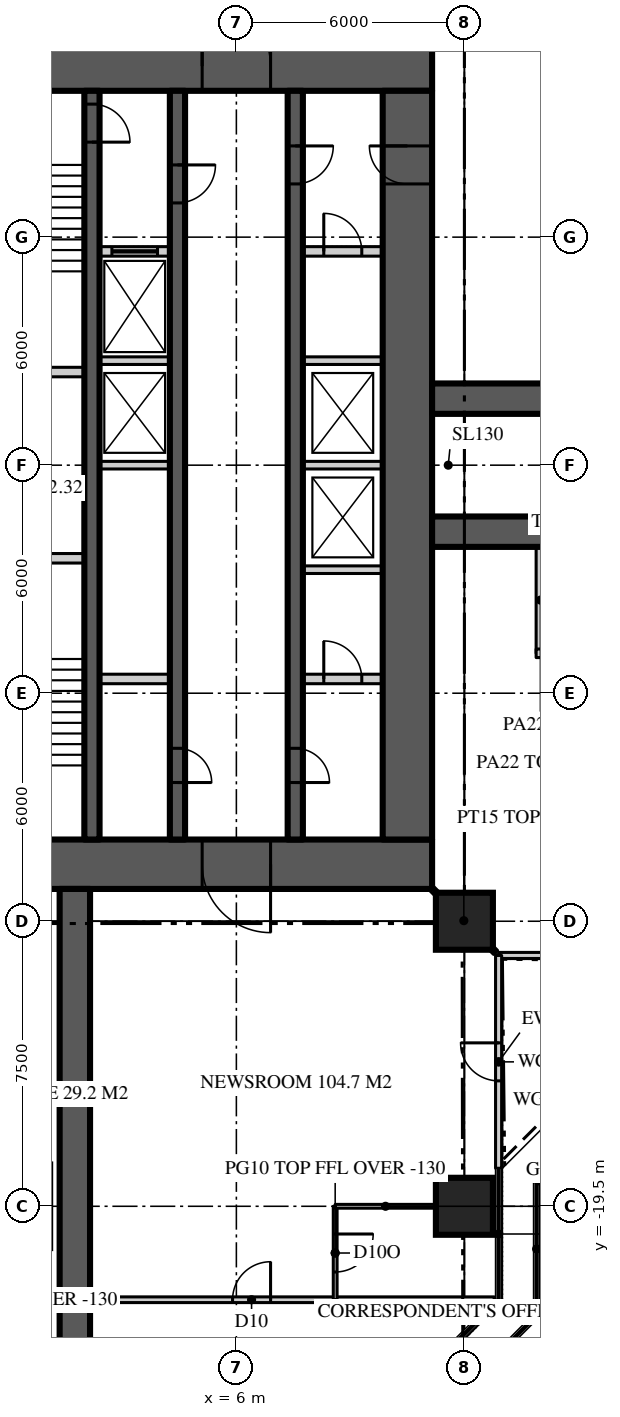
"""IFC4 building model, lengths in metres.
Left out: names, types, materials, properties, quantities, classifications, styles, units other than length and angle.
Written with IfcOpenShell. Run it as: python <this file> out.ifc"""

import sys

from ifc_helpers import new_model, si_unit, direction, frame, frame_2d, origin, origin_2d, place, context, subcontext, project, spatial, rectangle, extrude, element, fill, save


model = new_model("IFC4")
c1 = context("Model", 3, precision=1e-05, world=origin(), true_north=direction((0.0, 1.0)))
c2 = subcontext(c1, "Body", "Model", "MODEL_VIEW")
j1 = project(units=[si_unit("LENGTHUNIT", "METRE"), si_unit("PLANEANGLEUNIT", "RADIAN")], contexts=[c1])
p1 = place(None, origin())
s1 = spatial("IfcSite", under=j1, at=p1, CompositionType="ELEMENT")
p2 = place(p1, origin())
s2 = spatial("IfcBuilding", under=s1, at=p2, CompositionType="ELEMENT")
p3 = place(p2, frame((0.0, 0.0, 247.8)))
s3 = spatial("IfcBuildingStorey", under=s2, at=p3, CompositionType="ELEMENT", Elevation=247.8)
p4 = place(p3, frame((-11.15, 10.5, 0.0), z_axis=(0.0, 0.0, 1.0), x_axis=(1.0, 0.0, 0.0)))
e1 = element("IfcWall", 1, at=p4, inside=s3, PredefinedType="SHEAR", context=c2, shape_type="SweptSolid", body=[
    extrude(rectangle(XDim=22.3, YDim=1.3, at=frame_2d((11.15, 0.0))), origin(), (0.0, 0.0, 1.0), 3.9),
])
p5 = place(p4, frame((4.25, 0.0, 0.0)))
e2 = element("IfcOpeningElement", 2, at=p5, cuts=e1, PredefinedType="OPENING", context=c2, shape_type="SweptSolid", body=[
    extrude(rectangle(XDim=1.8, YDim=2.2, at=frame_2d((0.9, 1.1))), frame((0.0, 0.66, 0.0), z_axis=(0.0, -1.0, 0.0), x_axis=(1.0, 0.0, 0.0)), (0.0, 0.0, 1.0), 1.32),
])
p6 = place(p4, frame((16.25, 0.0, 0.0)))
e3 = element("IfcOpeningElement", 3, at=p6, cuts=e1, PredefinedType="OPENING", context=c2, shape_type="SweptSolid", body=[
    extrude(rectangle(XDim=1.8, YDim=2.2, at=frame_2d((0.9, 1.1))), frame((0.0, 0.66, 0.0), z_axis=(0.0, -1.0, 0.0), x_axis=(1.0, 0.0, 0.0)), (0.0, 0.0, 1.0), 1.32),
])
p7 = place(p3, frame((11.15, -10.5, 0.0), z_axis=(0.0, 0.0, 1.0), x_axis=(-1.0, 0.0, 0.0)))
e4 = element("IfcWall", 4, at=p7, inside=s3, PredefinedType="SHEAR", context=c2, shape_type="SweptSolid", body=[
    extrude(rectangle(XDim=22.3, YDim=1.3, at=frame_2d((11.15, 0.0))), origin(), (0.0, 0.0, 1.0), 3.9),
])
p8 = place(p7, frame((16.25, 0.0, 0.0)))
e5 = element("IfcOpeningElement", 5, at=p8, cuts=e4, PredefinedType="OPENING", context=c2, shape_type="SweptSolid", body=[
    extrude(rectangle(XDim=1.8, YDim=2.2, at=frame_2d((0.9, 1.1))), frame((0.0, 0.66, 0.0), z_axis=(0.0, -1.0, 0.0), x_axis=(1.0, 0.0, 0.0)), (0.0, 0.0, 1.0), 1.32),
])
p9 = place(p7, frame((4.25, 0.0, 0.0)))
e6 = element("IfcOpeningElement", 6, at=p9, cuts=e4, PredefinedType="OPENING", context=c2, shape_type="SweptSolid", body=[
    extrude(rectangle(XDim=1.8, YDim=2.2, at=frame_2d((0.9, 1.1))), frame((0.0, 0.66, 0.0), z_axis=(0.0, -1.0, 0.0), x_axis=(1.0, 0.0, 0.0)), (0.0, 0.0, 1.0), 1.32),
])
p10 = place(p3, frame((10.5, -9.85, 0.0), z_axis=(0.0, 0.0, 1.0), x_axis=(0.0, 1.0, 0.0)))
e7 = element("IfcWall", 7, at=p10, inside=s3, PredefinedType="SHEAR", context=c2, shape_type="SweptSolid", body=[
    extrude(rectangle(XDim=19.7, YDim=1.3, at=frame_2d((9.85, 0.0))), origin(), (0.0, 0.0, 1.0), 3.9),
])
p11 = place(p10, frame((17.25, 0.0, 0.0)))
e8 = element("IfcOpeningElement", 8, at=p11, cuts=e7, PredefinedType="OPENING", context=c2, shape_type="SweptSolid", body=[
    extrude(rectangle(XDim=1.0, YDim=2.2, at=frame_2d((0.5, 1.1))), frame((0.0, 0.66, 0.0), z_axis=(0.0, -1.0, 0.0), x_axis=(1.0, 0.0, 0.0)), (0.0, 0.0, 1.0), 1.32),
])
for number, where, z_axis, x_axis in (
    (9, (11.15, -1.75, 0.0), (0.0, 0.0, 1.0), (1.0, 0.0, 0.0)),
    (10, (11.15, 1.75, 0.0), (0.0, 0.0, 1.0), (1.0, 0.0, 0.0)),
    (11, (1.75, -11.15, 0.0), (0.0, 0.0, 1.0), (0.0, -1.0, 0.0)),
):
    element("IfcWall", number, at=place(p3, frame(where, z_axis=z_axis, x_axis=x_axis)), inside=s3, PredefinedType="SHEAR", context=c2, shape_type="SweptSolid", body=[
        extrude(rectangle(XDim=15.25, YDim=0.8, at=frame_2d((7.625, 0.0))), origin(), (0.0, 0.0, 1.0), 3.9),
    ])
for number, where, z_axis, x_axis in (
    (12, (12.0, -19.5, 0.0), (0.0, 0.0, 1.0), (1.0, 0.0, 0.0)),
    (13, (12.0, -12.0, 0.0), (0.0, 0.0, 1.0), (1.0, 0.0, 0.0)),
):
    element("IfcColumn", number, at=place(p3, frame(where, z_axis=z_axis, x_axis=x_axis)), inside=s3, PredefinedType="COLUMN", context=c2, shape_type="SweptSolid", body=[
        extrude(rectangle(XDim=1.5, YDim=1.5, at=origin_2d()), origin(), (0.0, 0.0, 1.0), 3.9),
    ])
p12 = place(p3, frame((12.9, -12.9, 0.0), z_axis=(0.0, 0.0, 1.0), x_axis=(1.0, 0.0, 0.0)))
e14 = element("IfcWall", 14, at=p12, inside=s3, PredefinedType="SOLIDWALL", context=c2, shape_type="SweptSolid", body=[
    extrude(rectangle(XDim=5.6, YDim=0.16, at=frame_2d((2.8, 0.0))), origin(), (0.0, 0.0, 1.0), 3.77),
])
p13 = place(p3, frame((12.9, -18.5, 0.0), z_axis=(0.0, 0.0, 1.0), x_axis=(0.0, 1.0, 0.0)))
e15 = element("IfcWall", 15, at=p13, inside=s3, PredefinedType="SOLIDWALL", context=c2, shape_type="SweptSolid", body=[
    extrude(rectangle(XDim=5.6, YDim=0.16, at=frame_2d((2.8, 0.0))), origin(), (0.0, 0.0, 1.0), 3.77),
])
p14 = place(p13, frame((2.3, 0.0, 0.0)))
e16 = element("IfcOpeningElement", 16, at=p14, cuts=e15, PredefinedType="OPENING", context=c2, shape_type="SweptSolid", body=[
    extrude(rectangle(XDim=1.0, YDim=2.2, at=frame_2d((0.5, 1.1))), frame((0.0, 0.09, 0.0), z_axis=(0.0, -1.0, 0.0), x_axis=(1.0, 0.0, 0.0)), (0.0, 0.0, 1.0), 0.18),
])
p15 = place(p3, frame((7.55, 9.85, 0.0), z_axis=(0.0, 0.0, 1.0), x_axis=(0.0, -1.0, 0.0)))
e17 = element("IfcWall", 17, at=p15, inside=s3, PredefinedType="SHEAR", context=c2, shape_type="SweptSolid", body=[
    extrude(rectangle(XDim=19.7, YDim=0.4, at=frame_2d((9.85, 0.0))), origin(), (0.0, 0.0, 1.0), 3.9),
])
p16 = place(p15, frame((1.45, 0.0, 0.0)))
e18 = element("IfcOpeningElement", 18, at=p16, cuts=e17, PredefinedType="OPENING", context=c2, shape_type="SweptSolid", body=[
    extrude(rectangle(XDim=1.0, YDim=2.2, at=frame_2d((0.5, 1.1))), frame((0.0, 0.21, 0.0), z_axis=(0.0, -1.0, 0.0), x_axis=(1.0, 0.0, 0.0)), (0.0, 0.0, 1.0), 0.42),
])
p17 = place(p15, frame((17.3, 0.0, 0.0)))
e19 = element("IfcOpeningElement", 19, at=p17, cuts=e17, PredefinedType="OPENING", context=c2, shape_type="SweptSolid", body=[
    extrude(rectangle(XDim=0.9, YDim=2.1, at=frame_2d((0.45, 1.05))), frame((0.0, 0.21, 0.0), z_axis=(0.0, -1.0, 0.0), x_axis=(1.0, 0.0, 0.0)), (0.0, 0.0, 1.0), 0.42),
])
p18 = place(p3, frame((4.45, 9.85, 0.0), z_axis=(0.0, 0.0, 1.0), x_axis=(0.0, -1.0, 0.0)))
e20 = element("IfcWall", 20, at=p18, inside=s3, PredefinedType="SHEAR", context=c2, shape_type="SweptSolid", body=[
    extrude(rectangle(XDim=19.7, YDim=0.4, at=frame_2d((9.85, 0.0))), origin(), (0.0, 0.0, 1.0), 3.9),
])
p19 = place(p18, frame((1.95, 0.0, 0.0)))
e21 = element("IfcOpeningElement", 21, at=p19, cuts=e20, PredefinedType="OPENING", context=c2, shape_type="SweptSolid", body=[
    extrude(rectangle(XDim=1.0, YDim=2.2, at=frame_2d((0.5, 1.1))), frame((0.0, 0.21, 0.0), z_axis=(0.0, -1.0, 0.0), x_axis=(1.0, 0.0, 0.0)), (0.0, 0.0, 1.0), 0.42),
])
p20 = place(p18, frame((17.3, 0.0, 0.0)))
e22 = element("IfcOpeningElement", 22, at=p20, cuts=e20, PredefinedType="OPENING", context=c2, shape_type="SweptSolid", body=[
    extrude(rectangle(XDim=0.9, YDim=2.1, at=frame_2d((0.45, 1.05))), frame((0.0, 0.21, 0.0), z_axis=(0.0, -1.0, 0.0), x_axis=(1.0, 0.0, 0.0)), (0.0, 0.0, 1.0), 0.42),
])
p21 = place(p3, frame((2.2, 9.85, 0.0), z_axis=(0.0, 0.0, 1.0), x_axis=(0.0, -1.0, 0.0)))
e23 = element("IfcWall", 23, at=p21, inside=s3, PredefinedType="SHEAR", context=c2, shape_type="SweptSolid", body=[
    extrude(rectangle(XDim=19.7, YDim=0.4, at=frame_2d((9.85, 0.0))), origin(), (0.0, 0.0, 1.0), 3.9),
])
p22 = place(p21, frame((0.35, 0.0, 0.0)))
e24 = element("IfcOpeningElement", 24, at=p22, cuts=e23, PredefinedType="OPENING", context=c2, shape_type="SweptSolid", body=[
    extrude(rectangle(XDim=1.0, YDim=2.2, at=frame_2d((0.5, 1.1))), frame((0.0, 0.21, 0.0), z_axis=(0.0, -1.0, 0.0), x_axis=(1.0, 0.0, 0.0)), (0.0, 0.0, 1.0), 0.42),
])
p23 = place(p3, frame((2.4, 5.625, 0.0), z_axis=(0.0, 0.0, 1.0), x_axis=(1.0, 0.0, 0.0)))
e25 = element("IfcWall", 25, at=p23, inside=s3, PredefinedType="SOLIDWALL", context=c2, shape_type="SweptSolid", body=[
    extrude(rectangle(XDim=1.85, YDim=0.25, at=frame_2d((0.925, 0.0))), origin(), (0.0, 0.0, 1.0), 3.7),
])
p24 = place(p23, frame((0.325, 0.0, 0.0)))
e26 = element("IfcOpeningElement", 26, at=p24, cuts=e25, PredefinedType="OPENING", context=c2, shape_type="SweptSolid", body=[
    extrude(rectangle(XDim=1.2, YDim=2.2, at=frame_2d((0.6, 1.1))), frame((0.0, 0.135, 0.0), z_axis=(0.0, -1.0, 0.0), x_axis=(1.0, 0.0, 0.0)), (0.0, 0.0, 1.0), 0.27),
])
p25 = place(p3, frame((7.75, 5.625, 0.0), z_axis=(0.0, 0.0, 1.0), x_axis=(1.0, 0.0, 0.0)))
e27 = element("IfcWall", 27, at=p25, inside=s3, PredefinedType="SOLIDWALL", context=c2, shape_type="SweptSolid", body=[
    extrude(rectangle(XDim=2.1, YDim=0.25, at=frame_2d((1.05, 0.0))), origin(), (0.0, 0.0, 1.0), 3.7),
])
p26 = place(p25, frame((0.55, 0.0, 0.0)))
e28 = element("IfcOpeningElement", 28, at=p26, cuts=e27, PredefinedType="OPENING", context=c2, shape_type="SweptSolid", body=[
    extrude(rectangle(XDim=1.0, YDim=2.2, at=frame_2d((0.5, 1.1))), frame((0.0, 0.135, 0.0), z_axis=(0.0, -1.0, 0.0), x_axis=(1.0, 0.0, 0.0)), (0.0, 0.0, 1.0), 0.27),
])
p27 = place(p3, frame((2.4, -5.625, 0.0), z_axis=(0.0, 0.0, 1.0), x_axis=(1.0, 0.0, 0.0)))
e29 = element("IfcWall", 29, at=p27, inside=s3, PredefinedType="SOLIDWALL", context=c2, shape_type="SweptSolid", body=[
    extrude(rectangle(XDim=1.85, YDim=0.25, at=frame_2d((0.925, 0.0))), origin(), (0.0, 0.0, 1.0), 3.7),
])
p28 = place(p3, frame((7.75, -5.625, 0.0), z_axis=(0.0, 0.0, 1.0), x_axis=(1.0, 0.0, 0.0)))
e30 = element("IfcWall", 30, at=p28, inside=s3, PredefinedType="SOLIDWALL", context=c2, shape_type="SweptSolid", body=[
    extrude(rectangle(XDim=2.1, YDim=0.25, at=frame_2d((1.05, 0.0))), origin(), (0.0, 0.0, 1.0), 3.7),
])
p29 = place(p28, frame((0.55, 0.0, 0.0)))
e31 = element("IfcOpeningElement", 31, at=p29, cuts=e30, PredefinedType="OPENING", context=c2, shape_type="SweptSolid", body=[
    extrude(rectangle(XDim=1.0, YDim=2.2, at=frame_2d((0.5, 1.1))), frame((0.0, 0.135, 0.0), z_axis=(0.0, -1.0, 0.0), x_axis=(1.0, 0.0, 0.0)), (0.0, 0.0, 1.0), 0.27),
])
for number, where, z_axis, x_axis in (
    (32, (-2.0, -2.45, 0.0), (0.0, 0.0, 1.0), (1.0, 0.0, 0.0)),
    (33, (-2.0, 2.45, 0.0), (0.0, 0.0, 1.0), (1.0, 0.0, 0.0)),
):
    element("IfcWall", number, at=place(p3, frame(where, z_axis=z_axis, x_axis=x_axis)), inside=s3, PredefinedType="SOLIDWALL", context=c2, shape_type="SweptSolid", body=[
        extrude(rectangle(XDim=4.0, YDim=0.25, at=frame_2d((2.0, 0.0))), origin(), (0.0, 0.0, 1.0), 3.7),
    ])
p30 = place(p3, frame((7.75, -2.75, 0.0), z_axis=(0.0, 0.0, 1.0), x_axis=(1.0, 0.0, 0.0)))
e34 = element("IfcWall", 34, at=p30, inside=s3, PredefinedType="SOLIDWALL", context=c2, shape_type="SweptSolid", body=[
    extrude(rectangle(XDim=2.1, YDim=0.2, at=frame_2d((1.05, 0.0))), origin(), (0.0, 0.0, 1.0), 3.7),
])
p31 = place(p3, frame((2.4, 0.0, 0.0), z_axis=(0.0, 0.0, 1.0), x_axis=(1.0, 0.0, 0.0)))
e35 = element("IfcWall", 35, at=p31, inside=s3, PredefinedType="SOLIDWALL", context=c2, shape_type="SweptSolid", body=[
    extrude(rectangle(XDim=1.85, YDim=0.2, at=frame_2d((0.925, 0.0))), origin(), (0.0, 0.0, 1.0), 3.7),
])
p32 = place(p3, frame((7.75, 0.0, 0.0), z_axis=(0.0, 0.0, 1.0), x_axis=(1.0, 0.0, 0.0)))
e36 = element("IfcWall", 36, at=p32, inside=s3, PredefinedType="SOLIDWALL", context=c2, shape_type="SweptSolid", body=[
    extrude(rectangle(XDim=2.1, YDim=0.2, at=frame_2d((1.05, 0.0))), origin(), (0.0, 0.0, 1.0), 3.7),
])
p33 = place(p3, frame((2.4, 2.75, 0.0), z_axis=(0.0, 0.0, 1.0), x_axis=(1.0, 0.0, 0.0)))
e37 = element("IfcWall", 37, at=p33, inside=s3, PredefinedType="SOLIDWALL", context=c2, shape_type="SweptSolid", body=[
    extrude(rectangle(XDim=1.85, YDim=0.2, at=frame_2d((0.925, 0.0))), origin(), (0.0, 0.0, 1.0), 3.7),
])
p34 = place(p3, frame((7.75, 2.75, 0.0), z_axis=(0.0, 0.0, 1.0), x_axis=(1.0, 0.0, 0.0)))
e38 = element("IfcWall", 38, at=p34, inside=s3, PredefinedType="SOLIDWALL", context=c2, shape_type="SweptSolid", body=[
    extrude(rectangle(XDim=2.1, YDim=0.2, at=frame_2d((1.05, 0.0))), origin(), (0.0, 0.0, 1.0), 3.7),
])
p35 = place(p3, frame((14.0, -2.15, 0.0), z_axis=(0.0, 0.0, 1.0), x_axis=(0.0, -1.0, 0.0)))
e39 = element("IfcWall", 39, at=p35, inside=s3, PredefinedType="PARTITIONING", context=c2, shape_type="SweptSolid", body=[
    extrude(rectangle(XDim=2.8, YDim=0.225, at=frame_2d((1.4, 0.0))), origin(), (0.0, 0.0, 1.0), 3.18),
])
p36 = place(p3, frame((13.887, -4.95, 0.0), z_axis=(0.0, 0.0, 1.0), x_axis=(1.0, 0.0, 0.0)))
e40 = element("IfcWall", 40, at=p36, inside=s3, PredefinedType="PARTITIONING", context=c2, shape_type="SweptSolid", body=[
    extrude(rectangle(XDim=2.625, YDim=0.225, at=frame_2d((1.312, 0.0))), origin(), (0.0, 0.0, 1.0), 3.77),
])
p37 = place(p36, frame((0.712, 0.0, 0.0)))
e41 = element("IfcOpeningElement", 41, at=p37, cuts=e40, PredefinedType="OPENING", context=c2, shape_type="SweptSolid", body=[
    extrude(rectangle(XDim=1.2, YDim=2.2, at=frame_2d((0.6, 1.1))), frame((0.0, 0.123, 0.0), z_axis=(0.0, -1.0, 0.0), x_axis=(1.0, 0.0, 0.0)), (0.0, 0.0, 1.0), 0.245),
])
p38 = place(p3, frame((-12.786, -21.959, 0.0), z_axis=(0.0, 0.0, 1.0), x_axis=(1.0, 0.0, 0.0)))
e42 = element("IfcWall", 42, at=p38, inside=s3, PredefinedType="PARTITIONING", context=c2, shape_type="SweptSolid", body=[
    extrude(rectangle(XDim=25.573, YDim=0.15, at=frame_2d((12.786, 0.0))), origin(), (0.0, 0.0, 1.0), 3.77),
])
p39 = place(p38, frame((18.687, 0.0, 0.0)))
e43 = element("IfcOpeningElement", 43, at=p39, cuts=e42, PredefinedType="OPENING", context=c2, shape_type="SweptSolid", body=[
    extrude(rectangle(XDim=1.0, YDim=2.2, at=frame_2d((0.5, 1.1))), frame((0.0, 0.085, 0.0), z_axis=(0.0, -1.0, 0.0), x_axis=(1.0, 0.0, 0.0)), (0.0, 0.0, 1.0), 0.17),
])
p40 = place(p38, frame((5.886, 0.0, 0.0)))
e44 = element("IfcOpeningElement", 44, at=p40, cuts=e42, PredefinedType="OPENING", context=c2, shape_type="SweptSolid", body=[
    extrude(rectangle(XDim=1.0, YDim=2.2, at=frame_2d((0.5, 1.1))), frame((0.0, 0.085, 0.0), z_axis=(0.0, -1.0, 0.0), x_axis=(1.0, 0.0, 0.0)), (0.0, 0.0, 1.0), 0.17),
])
p41 = place(p3, frame((8.6, -19.5, 0.0), z_axis=(0.0, 0.0, 1.0), x_axis=(0.0, -1.0, 0.0)))
e45 = element("IfcWall", 45, at=p41, inside=s3, PredefinedType="PARTITIONING", context=c2, shape_type="SweptSolid", body=[
    extrude(rectangle(XDim=2.459, YDim=0.1, at=frame_2d((1.229, 0.0))), origin(), (0.0, 0.0, 1.0), 3.77),
])
p42 = place(p41, frame((0.729, 0.0, 0.0)))
e46 = element("IfcOpeningElement", 46, at=p42, cuts=e45, PredefinedType="OPENING", context=c2, shape_type="SweptSolid", body=[
    extrude(rectangle(XDim=1.0, YDim=2.2, at=frame_2d((0.5, 1.1))), frame((0.0, 0.06, 0.0), z_axis=(0.0, -1.0, 0.0), x_axis=(1.0, 0.0, 0.0)), (0.0, 0.0, 1.0), 0.12),
])
p43 = place(p3, frame((8.6, -19.5, 0.0), z_axis=(0.0, 0.0, 1.0), x_axis=(1.0, 0.0, 0.0)))
e47 = element("IfcWall", 47, at=p43, inside=s3, PredefinedType="PARTITIONING", context=c2, shape_type="SweptSolid", body=[
    extrude(rectangle(XDim=2.65, YDim=0.1, at=frame_2d((1.325, 0.0))), origin(), (0.0, 0.0, 1.0), 2.77),
])
p44 = place(p3, frame((11.15, -11.15, 0.0), z_axis=(0.0, 0.0, 1.0), x_axis=(0.707106781187, -0.707106781187, 0.0)))
e48 = element("IfcWall", 48, at=p44, inside=s3, PredefinedType="PARTITIONING", context=c2, shape_type="SweptSolid", body=[
    extrude(rectangle(XDim=2.362, YDim=0.15, at=frame_2d((1.181, 0.0))), origin(), (0.0, 0.0, 1.0), 3.22),
])
p45 = place(p14, origin())
e49 = element("IfcDoor", 49, at=p45, inside=s3, OperationType="SINGLE_SWING_RIGHT", PredefinedType="DOOR", context=c2, shape_type="SweptSolid", body=[
    extrude(rectangle(XDim=1.0, YDim=2.2, at=frame_2d((0.5, 1.1))), frame((0.0, 0.025, 0.0), z_axis=(0.0, -1.0, 0.0), x_axis=(1.0, 0.0, 0.0)), (0.0, 0.0, 1.0), 0.05),
])
fill(e16, e49)
p46 = place(p6, origin())
e50 = element("IfcDoor", 50, at=p46, inside=s3, OperationType="DOUBLE_DOOR_DOUBLE_SWING", PredefinedType="DOOR", context=c2, shape_type="SweptSolid", body=[
    extrude(rectangle(XDim=1.8, YDim=2.2, at=frame_2d((0.9, 1.1))), frame((0.0, 0.025, 0.0), z_axis=(0.0, -1.0, 0.0), x_axis=(1.0, 0.0, 0.0)), (0.0, 0.0, 1.0), 0.05),
])
fill(e3, e50)
p47 = place(p9, origin())
e51 = element("IfcDoor", 51, at=p47, inside=s3, OperationType="DOUBLE_DOOR_DOUBLE_SWING", PredefinedType="DOOR", context=c2, shape_type="SweptSolid", body=[
    extrude(rectangle(XDim=1.8, YDim=2.2, at=frame_2d((0.9, 1.1))), frame((0.0, 0.025, 0.0), z_axis=(0.0, -1.0, 0.0), x_axis=(1.0, 0.0, 0.0)), (0.0, 0.0, 1.0), 0.05),
])
fill(e6, e51)
p48 = place(p16, origin())
e52 = element("IfcDoor", 52, at=p48, inside=s3, OperationType="SINGLE_SWING_LEFT", PredefinedType="DOOR", context=c2, shape_type="SweptSolid", body=[
    extrude(rectangle(XDim=1.0, YDim=2.2, at=frame_2d((0.5, 1.1))), frame((0.0, 0.025, 0.0), z_axis=(0.0, -1.0, 0.0), x_axis=(1.0, 0.0, 0.0)), (0.0, 0.0, 1.0), 0.05),
])
fill(e18, e52)
p49 = place(p11, origin())
e53 = element("IfcDoor", 53, at=p49, inside=s3, OperationType="SINGLE_SWING_RIGHT", PredefinedType="DOOR", context=c2, shape_type="SweptSolid", body=[
    extrude(rectangle(XDim=1.0, YDim=2.2, at=frame_2d((0.5, 1.1))), frame((0.0, 0.025, 0.0), z_axis=(0.0, -1.0, 0.0), x_axis=(1.0, 0.0, 0.0)), (0.0, 0.0, 1.0), 0.05),
])
fill(e8, e53)
p50 = place(p19, origin())
e54 = element("IfcDoor", 54, at=p50, inside=s3, OperationType="SINGLE_SWING_LEFT", PredefinedType="DOOR", context=c2, shape_type="SweptSolid", body=[
    extrude(rectangle(XDim=1.0, YDim=2.2, at=frame_2d((0.5, 1.1))), frame((0.0, 0.025, 0.0), z_axis=(0.0, -1.0, 0.0), x_axis=(1.0, 0.0, 0.0)), (0.0, 0.0, 1.0), 0.05),
])
fill(e21, e54)
p51 = place(p22, origin())
e55 = element("IfcDoor", 55, at=p51, inside=s3, OperationType="SINGLE_SWING_RIGHT", PredefinedType="DOOR", context=c2, shape_type="SweptSolid", body=[
    extrude(rectangle(XDim=1.0, YDim=2.2, at=frame_2d((0.5, 1.1))), frame((0.0, 0.025, 0.0), z_axis=(0.0, -1.0, 0.0), x_axis=(1.0, 0.0, 0.0)), (0.0, 0.0, 1.0), 0.05),
])
fill(e24, e55)
p52 = place(p17, origin())
e56 = element("IfcDoor", 56, at=p52, inside=s3, OperationType="SINGLE_SWING_RIGHT", PredefinedType="DOOR", context=c2, shape_type="SweptSolid", body=[
    extrude(rectangle(XDim=0.9, YDim=2.1, at=frame_2d((0.45, 1.05))), frame((0.0, 0.025, 0.0), z_axis=(0.0, -1.0, 0.0), x_axis=(1.0, 0.0, 0.0)), (0.0, 0.0, 1.0), 0.05),
])
fill(e19, e56)
p53 = place(p20, origin())
e57 = element("IfcDoor", 57, at=p53, inside=s3, OperationType="SINGLE_SWING_RIGHT", PredefinedType="DOOR", context=c2, shape_type="SweptSolid", body=[
    extrude(rectangle(XDim=0.9, YDim=2.1, at=frame_2d((0.45, 1.05))), frame((0.0, 0.025, 0.0), z_axis=(0.0, -1.0, 0.0), x_axis=(1.0, 0.0, 0.0)), (0.0, 0.0, 1.0), 0.05),
])
fill(e22, e57)
p54 = place(p24, origin())
e58 = element("IfcDoor", 58, at=p54, inside=s3, OperationType="SLIDING_TO_LEFT", PredefinedType="DOOR", context=c2, shape_type="SweptSolid", body=[
    extrude(rectangle(XDim=1.2, YDim=2.2, at=frame_2d((0.6, 1.1))), frame((0.0, 0.025, 0.0), z_axis=(0.0, -1.0, 0.0), x_axis=(1.0, 0.0, 0.0)), (0.0, 0.0, 1.0), 0.05),
])
fill(e26, e58)
p55 = place(p39, origin())
e59 = element("IfcDoor", 59, at=p55, inside=s3, OperationType="SINGLE_SWING_RIGHT", PredefinedType="DOOR", context=c2, shape_type="SweptSolid", body=[
    extrude(rectangle(XDim=1.0, YDim=2.2, at=frame_2d((0.5, 1.1))), frame((0.0, 0.025, 0.0), z_axis=(0.0, -1.0, 0.0), x_axis=(1.0, 0.0, 0.0)), (0.0, 0.0, 1.0), 0.05),
])
fill(e43, e59)
p56 = place(p42, origin())
e60 = element("IfcDoor", 60, at=p56, inside=s3, OperationType="SINGLE_SWING_LEFT", PredefinedType="DOOR", context=c2, shape_type="SweptSolid", body=[
    extrude(rectangle(XDim=1.0, YDim=2.2, at=frame_2d((0.5, 1.1))), frame((0.0, 0.025, 0.0), z_axis=(0.0, -1.0, 0.0), x_axis=(1.0, 0.0, 0.0)), (0.0, 0.0, 1.0), 0.05),
])
fill(e46, e60)
p57 = place(p26, origin())
e61 = element("IfcDoor", 61, at=p57, inside=s3, OperationType="SINGLE_SWING_LEFT", PredefinedType="DOOR", context=c2, shape_type="SweptSolid", body=[
    extrude(rectangle(XDim=1.0, YDim=2.2, at=frame_2d((0.5, 1.1))), frame((0.0, 0.025, 0.0), z_axis=(0.0, -1.0, 0.0), x_axis=(1.0, 0.0, 0.0)), (0.0, 0.0, 1.0), 0.05),
])
fill(e28, e61)
p58 = place(p29, origin())
e62 = element("IfcDoor", 62, at=p58, inside=s3, OperationType="SINGLE_SWING_LEFT", PredefinedType="DOOR", context=c2, shape_type="SweptSolid", body=[
    extrude(rectangle(XDim=1.0, YDim=2.2, at=frame_2d((0.5, 1.1))), frame((0.0, 0.025, 0.0), z_axis=(0.0, -1.0, 0.0), x_axis=(1.0, 0.0, 0.0)), (0.0, 0.0, 1.0), 0.05),
])
fill(e31, e62)
save(model, sys.argv[1])
